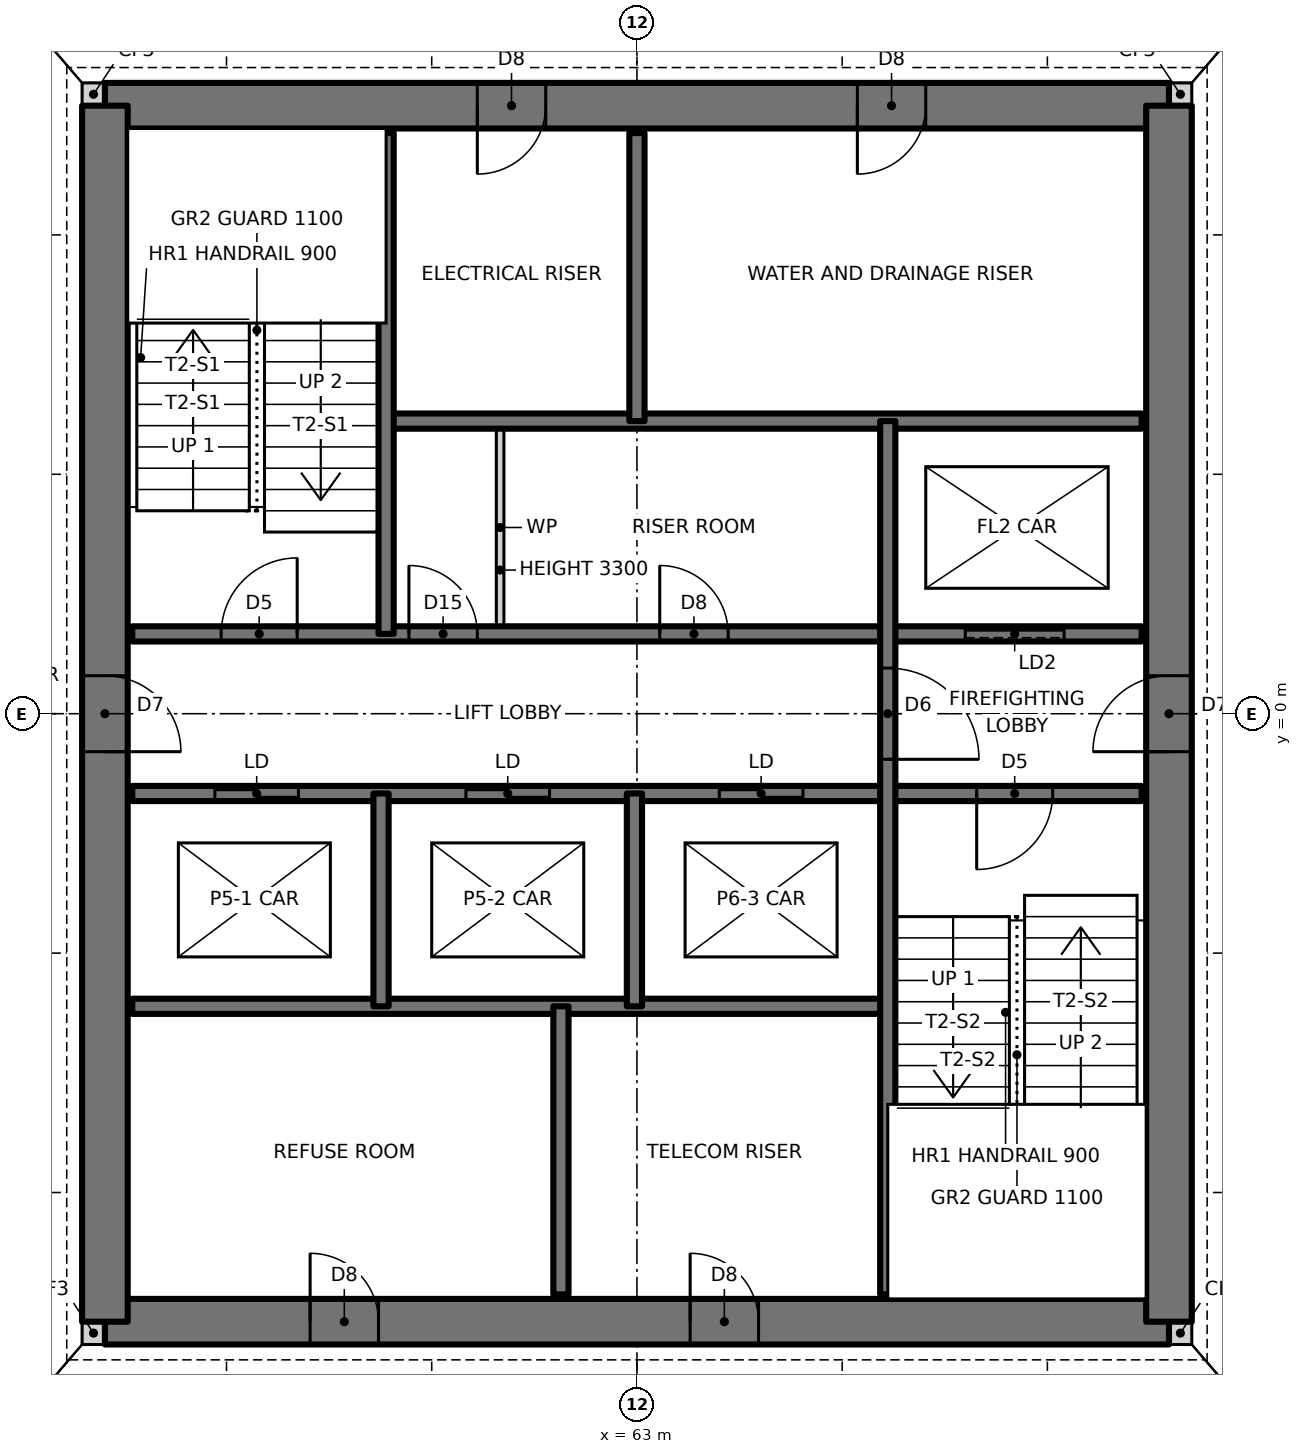
"""IFC4 building model, lengths in metres.
Left out: names, types, materials, properties, quantities, classifications, styles, units other than length and angle.
Written with IfcOpenShell. Run it as: python <this file> out.ifc"""

import sys

from ifc_helpers import new_model, si_unit, direction, frame, frame_2d, origin, place, context, subcontext, project, spatial, rectangle, extrude, element, fill, save


model = new_model("IFC4")
c1 = context("Model", 3, precision=1e-05, world=origin(), true_north=direction((0.0, 1.0)))
c2 = subcontext(c1, "Body", "Model", "MODEL_VIEW")
j1 = project(units=[si_unit("LENGTHUNIT", "METRE"), si_unit("PLANEANGLEUNIT", "RADIAN")], contexts=[c1])
p1 = place(None, origin())
s1 = spatial("IfcSite", under=j1, at=p1, CompositionType="ELEMENT")
p2 = place(p1, origin())
s2 = spatial("IfcBuilding", under=s1, at=p2, CompositionType="ELEMENT")
p3 = place(p2, frame((0.0, 0.0, 46.5)))
s3 = spatial("IfcBuildingStorey", under=s2, at=p3, CompositionType="ELEMENT", Elevation=46.5)
for number, where, z_axis, x_axis in (
    (1, (55.7, -8.15, 0.0), (0.0, 0.0, 1.0), (1.0, 0.0, 0.0)),
    (2, (70.0, -8.15, 0.0), (0.0, 0.0, 1.0), (1.0, 0.0, 0.0)),
    (3, (70.0, 8.15, 0.0), (0.0, 0.0, 1.0), (1.0, 0.0, 0.0)),
    (4, (55.7, 8.15, 0.0), (0.0, 0.0, 1.0), (1.0, 0.0, 0.0)),
):
    element("IfcWall", number, at=place(p3, frame(where, z_axis=z_axis, x_axis=x_axis)), inside=s3, PredefinedType="SOLIDWALL", context=c2, shape_type="SweptSolid", body=[
        extrude(rectangle(XDim=0.3, YDim=0.3, at=frame_2d((0.15, 0.0))), origin(), (0.0, 0.0, 1.0), 3.5),
    ])
p4 = place(p3, frame((56.0, -8.0, 0.0), z_axis=(0.0, 0.0, 1.0), x_axis=(1.0, 0.0, 0.0)))
e5 = element("IfcWall", 5, at=p4, inside=s3, PredefinedType="SHEAR", context=c2, shape_type="SweptSolid", body=[
    extrude(rectangle(XDim=14.0, YDim=0.6, at=frame_2d((7.0, 0.0))), origin(), (0.0, 0.0, 1.0), 3.5),
])
p5 = place(p4, frame((2.7, 0.0, 0.0)))
e6 = element("IfcOpeningElement", 6, at=p5, cuts=e5, PredefinedType="OPENING", context=c2, shape_type="SweptSolid", body=[
    extrude(rectangle(XDim=0.9, YDim=2.1, at=frame_2d((0.45, 1.05))), frame((0.0, 0.31, 0.0), z_axis=(0.0, -1.0, 0.0), x_axis=(1.0, 0.0, 0.0)), (0.0, 0.0, 1.0), 0.62),
])
p6 = place(p4, frame((7.7, 0.0, 0.0)))
e7 = element("IfcOpeningElement", 7, at=p6, cuts=e5, PredefinedType="OPENING", context=c2, shape_type="SweptSolid", body=[
    extrude(rectangle(XDim=0.9, YDim=2.1, at=frame_2d((0.45, 1.05))), frame((0.0, 0.31, 0.0), z_axis=(0.0, -1.0, 0.0), x_axis=(1.0, 0.0, 0.0)), (0.0, 0.0, 1.0), 0.62),
])
p7 = place(p3, frame((70.0, 8.0, 0.0), z_axis=(0.0, 0.0, 1.0), x_axis=(-1.0, 0.0, 0.0)))
e8 = element("IfcWall", 8, at=p7, inside=s3, PredefinedType="SHEAR", context=c2, shape_type="SweptSolid", body=[
    extrude(rectangle(XDim=14.0, YDim=0.6, at=frame_2d((7.0, 0.0))), origin(), (0.0, 0.0, 1.0), 3.5),
])
p8 = place(p7, frame((8.2, 0.0, 0.0)))
e9 = element("IfcOpeningElement", 9, at=p8, cuts=e8, PredefinedType="OPENING", context=c2, shape_type="SweptSolid", body=[
    extrude(rectangle(XDim=0.9, YDim=2.1, at=frame_2d((0.45, 1.05))), frame((0.0, 0.31, 0.0), z_axis=(0.0, -1.0, 0.0), x_axis=(1.0, 0.0, 0.0)), (0.0, 0.0, 1.0), 0.62),
])
p9 = place(p7, frame((3.2, 0.0, 0.0)))
e10 = element("IfcOpeningElement", 10, at=p9, cuts=e8, PredefinedType="OPENING", context=c2, shape_type="SweptSolid", body=[
    extrude(rectangle(XDim=0.9, YDim=2.1, at=frame_2d((0.45, 1.05))), frame((0.0, 0.31, 0.0), z_axis=(0.0, -1.0, 0.0), x_axis=(1.0, 0.0, 0.0)), (0.0, 0.0, 1.0), 0.62),
])
p10 = place(p3, frame((70.0, -8.0, 0.0), z_axis=(0.0, 0.0, 1.0), x_axis=(0.0, 1.0, 0.0)))
e11 = element("IfcWall", 11, at=p10, inside=s3, PredefinedType="SHEAR", context=c2, shape_type="SweptSolid", body=[
    extrude(rectangle(XDim=16.0, YDim=0.6, at=frame_2d((8.0, 0.0))), origin(), (0.0, 0.0, 1.0), 3.5),
])
p11 = place(p10, frame((7.5, 0.0, 0.0)))
e12 = element("IfcOpeningElement", 12, at=p11, cuts=e11, PredefinedType="OPENING", context=c2, shape_type="SweptSolid", body=[
    extrude(rectangle(XDim=1.0, YDim=2.1, at=frame_2d((0.5, 1.05))), frame((0.0, 0.31, 0.0), z_axis=(0.0, -1.0, 0.0), x_axis=(1.0, 0.0, 0.0)), (0.0, 0.0, 1.0), 0.62),
])
p12 = place(p3, frame((56.0, 8.0, 0.0), z_axis=(0.0, 0.0, 1.0), x_axis=(0.0, -1.0, 0.0)))
e13 = element("IfcWall", 13, at=p12, inside=s3, PredefinedType="SHEAR", context=c2, shape_type="SweptSolid", body=[
    extrude(rectangle(XDim=16.0, YDim=0.6, at=frame_2d((8.0, 0.0))), origin(), (0.0, 0.0, 1.0), 3.5),
])
p13 = place(p12, frame((7.5, 0.0, 0.0)))
e14 = element("IfcOpeningElement", 14, at=p13, cuts=e13, PredefinedType="OPENING", context=c2, shape_type="SweptSolid", body=[
    extrude(rectangle(XDim=1.0, YDim=2.1, at=frame_2d((0.5, 1.05))), frame((0.0, 0.31, 0.0), z_axis=(0.0, -1.0, 0.0), x_axis=(1.0, 0.0, 0.0)), (0.0, 0.0, 1.0), 0.62),
])
p14 = place(p3, frame((56.36, -3.85, 0.0), z_axis=(0.0, 0.0, 1.0), x_axis=(1.0, 0.0, 0.0)))
e15 = element("IfcWall", 15, at=p14, inside=s3, PredefinedType="SOLIDWALL", context=c2, shape_type="SweptSolid", body=[
    extrude(rectangle(XDim=9.94, YDim=0.2, at=frame_2d((4.97, 0.0))), origin(), (0.0, 0.0, 1.0), 3.5),
])
p15 = place(p3, frame((56.36, -1.05, 0.0), z_axis=(0.0, 0.0, 1.0), x_axis=(1.0, 0.0, 0.0)))
e16 = element("IfcWall", 16, at=p15, inside=s3, PredefinedType="SOLIDWALL", context=c2, shape_type="SweptSolid", body=[
    extrude(rectangle(XDim=13.28, YDim=0.2, at=frame_2d((6.64, 0.0))), origin(), (0.0, 0.0, 1.0), 3.5),
])
p16 = place(p15, frame((11.11, 0.0, 0.0)))
e17 = element("IfcOpeningElement", 17, at=p16, cuts=e16, PredefinedType="OPENING", context=c2, shape_type="SweptSolid", body=[
    extrude(rectangle(XDim=1.0, YDim=2.1, at=frame_2d((0.5, 1.05))), frame((0.0, 0.11, 0.0), z_axis=(0.0, -1.0, 0.0), x_axis=(1.0, 0.0, 0.0)), (0.0, 0.0, 1.0), 0.22),
])
p17 = place(p15, frame((1.087, 0.0, 0.0)))
e18 = element("IfcOpeningElement", 18, at=p17, cuts=e16, PredefinedType="OPENING", context=c2, shape_type="SweptSolid", body=[
    extrude(rectangle(XDim=1.1, YDim=2.1, at=frame_2d((0.55, 1.05))), frame((0.0, 0.11, 0.0), z_axis=(0.0, -1.0, 0.0), x_axis=(1.0, 0.0, 0.0)), (0.0, 0.0, 1.0), 0.22),
])
p18 = place(p15, frame((4.39, 0.0, 0.0)))
e19 = element("IfcOpeningElement", 19, at=p18, cuts=e16, PredefinedType="OPENING", context=c2, shape_type="SweptSolid", body=[
    extrude(rectangle(XDim=1.1, YDim=2.1, at=frame_2d((0.55, 1.05))), frame((0.0, 0.11, 0.0), z_axis=(0.0, -1.0, 0.0), x_axis=(1.0, 0.0, 0.0)), (0.0, 0.0, 1.0), 0.22),
])
p19 = place(p15, frame((7.724, 0.0, 0.0)))
e20 = element("IfcOpeningElement", 20, at=p19, cuts=e16, PredefinedType="OPENING", context=c2, shape_type="SweptSolid", body=[
    extrude(rectangle(XDim=1.1, YDim=2.1, at=frame_2d((0.55, 1.05))), frame((0.0, 0.11, 0.0), z_axis=(0.0, -1.0, 0.0), x_axis=(1.0, 0.0, 0.0)), (0.0, 0.0, 1.0), 0.22),
])
p20 = place(p3, frame((56.36, 1.05, 0.0), z_axis=(0.0, 0.0, 1.0), x_axis=(1.0, 0.0, 0.0)))
e21 = element("IfcWall", 21, at=p20, inside=s3, PredefinedType="SOLIDWALL", context=c2, shape_type="SweptSolid", body=[
    extrude(rectangle(XDim=13.28, YDim=0.2, at=frame_2d((6.64, 0.0))), origin(), (0.0, 0.0, 1.0), 3.5),
])
p21 = place(p20, frame((1.17, 0.0, 0.0)))
e22 = element("IfcOpeningElement", 22, at=p21, cuts=e21, PredefinedType="OPENING", context=c2, shape_type="SweptSolid", body=[
    extrude(rectangle(XDim=1.0, YDim=2.1, at=frame_2d((0.5, 1.05))), frame((0.0, 0.11, 0.0), z_axis=(0.0, -1.0, 0.0), x_axis=(1.0, 0.0, 0.0)), (0.0, 0.0, 1.0), 0.22),
])
p22 = place(p20, frame((6.94, 0.0, 0.0)))
e23 = element("IfcOpeningElement", 23, at=p22, cuts=e21, PredefinedType="OPENING", context=c2, shape_type="SweptSolid", body=[
    extrude(rectangle(XDim=0.9, YDim=2.1, at=frame_2d((0.45, 1.05))), frame((0.0, 0.11, 0.0), z_axis=(0.0, -1.0, 0.0), x_axis=(1.0, 0.0, 0.0)), (0.0, 0.0, 1.0), 0.22),
])
p23 = place(p20, frame((3.64, 0.0, 0.0)))
e24 = element("IfcOpeningElement", 24, at=p23, cuts=e21, PredefinedType="OPENING", context=c2, shape_type="SweptSolid", body=[
    extrude(rectangle(XDim=0.9, YDim=2.1, at=frame_2d((0.45, 1.05))), frame((0.0, 0.11, 0.0), z_axis=(0.0, -1.0, 0.0), x_axis=(1.0, 0.0, 0.0)), (0.0, 0.0, 1.0), 0.22),
])
p24 = place(p20, frame((10.96, 0.0, 0.0)))
e25 = element("IfcOpeningElement", 25, at=p24, cuts=e21, PredefinedType="OPENING", context=c2, shape_type="SweptSolid", body=[
    extrude(rectangle(XDim=1.3, YDim=2.1, at=frame_2d((0.65, 1.05))), frame((0.0, 0.11, 0.0), z_axis=(0.0, -1.0, 0.0), x_axis=(1.0, 0.0, 0.0)), (0.0, 0.0, 1.0), 0.22),
])
p25 = place(p3, frame((59.7, 3.85, 0.0), z_axis=(0.0, 0.0, 1.0), x_axis=(1.0, 0.0, 0.0)))
e26 = element("IfcWall", 26, at=p25, inside=s3, PredefinedType="SOLIDWALL", context=c2, shape_type="SweptSolid", body=[
    extrude(rectangle(XDim=9.94, YDim=0.2, at=frame_2d((4.97, 0.0))), origin(), (0.0, 0.0, 1.0), 3.5),
])
p26 = place(p3, frame((66.3, -7.64, 0.0), z_axis=(0.0, 0.0, 1.0), x_axis=(0.0, 1.0, 0.0)))
e27 = element("IfcWall", 27, at=p26, inside=s3, PredefinedType="SOLIDWALL", context=c2, shape_type="SweptSolid", body=[
    extrude(rectangle(XDim=11.49, YDim=0.2, at=frame_2d((5.745, 0.0))), origin(), (0.0, 0.0, 1.0), 3.5),
])
p27 = place(p26, frame((7.04, 0.0, 0.0)))
e28 = element("IfcOpeningElement", 28, at=p27, cuts=e27, PredefinedType="OPENING", context=c2, shape_type="SweptSolid", body=[
    extrude(rectangle(XDim=1.2, YDim=2.1, at=frame_2d((0.6, 1.05))), frame((0.0, 0.11, 0.0), z_axis=(0.0, -1.0, 0.0), x_axis=(1.0, 0.0, 0.0)), (0.0, 0.0, 1.0), 0.22),
])
p28 = place(p3, frame((63.0, 3.85, 0.0), z_axis=(0.0, 0.0, 1.0), x_axis=(0.0, 1.0, 0.0)))
e29 = element("IfcWall", 29, at=p28, inside=s3, PredefinedType="SOLIDWALL", context=c2, shape_type="SweptSolid", body=[
    extrude(rectangle(XDim=3.79, YDim=0.2, at=frame_2d((1.895, 0.0))), origin(), (0.0, 0.0, 1.0), 3.5),
])
p29 = place(p3, frame((62.967, -3.85, 0.0), z_axis=(0.0, 0.0, 1.0), x_axis=(0.0, 1.0, 0.0)))
e30 = element("IfcWall", 30, at=p29, inside=s3, PredefinedType="SOLIDWALL", context=c2, shape_type="SweptSolid", body=[
    extrude(rectangle(XDim=2.8, YDim=0.2, at=frame_2d((1.4, 0.0))), origin(), (0.0, 0.0, 1.0), 3.5),
])
p30 = place(p3, frame((62.0, -7.64, 0.0), z_axis=(0.0, 0.0, 1.0), x_axis=(0.0, 1.0, 0.0)))
e31 = element("IfcWall", 31, at=p30, inside=s3, PredefinedType="SOLIDWALL", context=c2, shape_type="SweptSolid", body=[
    extrude(rectangle(XDim=3.79, YDim=0.2, at=frame_2d((1.895, 0.0))), origin(), (0.0, 0.0, 1.0), 3.5),
])
p31 = place(p3, frame((61.2, 1.05, 0.0), z_axis=(0.0, 0.0, 1.0), x_axis=(0.0, 1.0, 0.0)))
e32 = element("IfcWall", 32, at=p31, inside=s3, PredefinedType="PARTITIONING", context=c2, shape_type="SweptSolid", body=[
    extrude(rectangle(XDim=2.8, YDim=0.1, at=frame_2d((1.4, 0.0))), origin(), (0.0, 0.0, 1.0), 3.3),
])
p32 = place(p3, frame((59.7, 1.05, 0.0), z_axis=(0.0, 0.0, 1.0), x_axis=(0.0, 1.0, 0.0)))
e33 = element("IfcWall", 33, at=p32, inside=s3, PredefinedType="SOLIDWALL", context=c2, shape_type="SweptSolid", body=[
    extrude(rectangle(XDim=6.59, YDim=0.2, at=frame_2d((3.295, 0.0))), origin(), (0.0, 0.0, 1.0), 3.5),
])
p33 = place(p3, frame((59.633, -3.85, 0.0), z_axis=(0.0, 0.0, 1.0), x_axis=(0.0, 1.0, 0.0)))
e34 = element("IfcWall", 34, at=p33, inside=s3, PredefinedType="SOLIDWALL", context=c2, shape_type="SweptSolid", body=[
    extrude(rectangle(XDim=2.8, YDim=0.2, at=frame_2d((1.4, 0.0))), origin(), (0.0, 0.0, 1.0), 3.5),
])
p34 = place(p21, origin())
e35 = element("IfcDoor", 35, at=p34, inside=s3, OperationType="SINGLE_SWING_RIGHT", PredefinedType="DOOR", context=c2, shape_type="SweptSolid", body=[
    extrude(rectangle(XDim=1.0, YDim=2.1, at=frame_2d((0.5, 1.05))), frame((0.0, 0.025, 0.0), z_axis=(0.0, -1.0, 0.0), x_axis=(1.0, 0.0, 0.0)), (0.0, 0.0, 1.0), 0.05),
])
fill(e22, e35)
p35 = place(p16, frame((1.0, 0.0, 0.0), z_axis=(0.0, 0.0, 1.0), x_axis=(-1.0, 0.0, 0.0)))
e36 = element("IfcDoor", 36, at=p35, inside=s3, OperationType="SINGLE_SWING_RIGHT", PredefinedType="DOOR", context=c2, shape_type="SweptSolid", body=[
    extrude(rectangle(XDim=1.0, YDim=2.1, at=frame_2d((0.5, 1.05))), frame((0.0, 0.025, 0.0), z_axis=(0.0, -1.0, 0.0), x_axis=(1.0, 0.0, 0.0)), (0.0, 0.0, 1.0), 0.05),
])
fill(e17, e36)
p36 = place(p27, frame((1.2, 0.0, 0.0), z_axis=(0.0, 0.0, 1.0), x_axis=(-1.0, 0.0, 0.0)))
e37 = element("IfcDoor", 37, at=p36, inside=s3, OperationType="SINGLE_SWING_RIGHT", PredefinedType="DOOR", context=c2, shape_type="SweptSolid", body=[
    extrude(rectangle(XDim=1.2, YDim=2.1, at=frame_2d((0.6, 1.05))), frame((0.0, 0.025, 0.0), z_axis=(0.0, -1.0, 0.0), x_axis=(1.0, 0.0, 0.0)), (0.0, 0.0, 1.0), 0.05),
])
fill(e28, e37)
p37 = place(p22, origin())
e38 = element("IfcDoor", 38, at=p37, inside=s3, OperationType="SINGLE_SWING_LEFT", PredefinedType="DOOR", context=c2, shape_type="SweptSolid", body=[
    extrude(rectangle(XDim=0.9, YDim=2.1, at=frame_2d((0.45, 1.05))), frame((0.0, 0.025, 0.0), z_axis=(0.0, -1.0, 0.0), x_axis=(1.0, 0.0, 0.0)), (0.0, 0.0, 1.0), 0.05),
])
fill(e23, e38)
p38 = place(p23, origin())
e39 = element("IfcDoor", 39, at=p38, inside=s3, OperationType="SINGLE_SWING_LEFT", PredefinedType="DOOR", context=c2, shape_type="SweptSolid", body=[
    extrude(rectangle(XDim=0.9, YDim=2.1, at=frame_2d((0.45, 1.05))), frame((0.0, 0.025, 0.0), z_axis=(0.0, -1.0, 0.0), x_axis=(1.0, 0.0, 0.0)), (0.0, 0.0, 1.0), 0.05),
])
fill(e24, e39)
p39 = place(p13, origin())
e40 = element("IfcDoor", 40, at=p39, inside=s3, OperationType="SINGLE_SWING_RIGHT", PredefinedType="DOOR", context=c2, shape_type="SweptSolid", body=[
    extrude(rectangle(XDim=1.0, YDim=2.1, at=frame_2d((0.5, 1.05))), frame((0.0, 0.025, 0.0), z_axis=(0.0, -1.0, 0.0), x_axis=(1.0, 0.0, 0.0)), (0.0, 0.0, 1.0), 0.05),
])
fill(e14, e40)
p40 = place(p11, origin())
e41 = element("IfcDoor", 41, at=p40, inside=s3, OperationType="SINGLE_SWING_LEFT", PredefinedType="DOOR", context=c2, shape_type="SweptSolid", body=[
    extrude(rectangle(XDim=1.0, YDim=2.1, at=frame_2d((0.5, 1.05))), frame((0.0, 0.025, 0.0), z_axis=(0.0, -1.0, 0.0), x_axis=(1.0, 0.0, 0.0)), (0.0, 0.0, 1.0), 0.05),
])
fill(e12, e41)
p41 = place(p8, origin())
e42 = element("IfcDoor", 42, at=p41, inside=s3, OperationType="SINGLE_SWING_RIGHT", PredefinedType="DOOR", context=c2, shape_type="SweptSolid", body=[
    extrude(rectangle(XDim=0.9, YDim=2.1, at=frame_2d((0.45, 1.05))), frame((0.0, 0.025, 0.0), z_axis=(0.0, -1.0, 0.0), x_axis=(1.0, 0.0, 0.0)), (0.0, 0.0, 1.0), 0.05),
])
fill(e9, e42)
p42 = place(p9, origin())
e43 = element("IfcDoor", 43, at=p42, inside=s3, OperationType="SINGLE_SWING_RIGHT", PredefinedType="DOOR", context=c2, shape_type="SweptSolid", body=[
    extrude(rectangle(XDim=0.9, YDim=2.1, at=frame_2d((0.45, 1.05))), frame((0.0, 0.025, 0.0), z_axis=(0.0, -1.0, 0.0), x_axis=(1.0, 0.0, 0.0)), (0.0, 0.0, 1.0), 0.05),
])
fill(e10, e43)
p43 = place(p5, origin())
e44 = element("IfcDoor", 44, at=p43, inside=s3, OperationType="SINGLE_SWING_LEFT", PredefinedType="DOOR", context=c2, shape_type="SweptSolid", body=[
    extrude(rectangle(XDim=0.9, YDim=2.1, at=frame_2d((0.45, 1.05))), frame((0.0, 0.025, 0.0), z_axis=(0.0, -1.0, 0.0), x_axis=(1.0, 0.0, 0.0)), (0.0, 0.0, 1.0), 0.05),
])
fill(e6, e44)
p44 = place(p6, origin())
e45 = element("IfcDoor", 45, at=p44, inside=s3, OperationType="SINGLE_SWING_LEFT", PredefinedType="DOOR", context=c2, shape_type="SweptSolid", body=[
    extrude(rectangle(XDim=0.9, YDim=2.1, at=frame_2d((0.45, 1.05))), frame((0.0, 0.025, 0.0), z_axis=(0.0, -1.0, 0.0), x_axis=(1.0, 0.0, 0.0)), (0.0, 0.0, 1.0), 0.05),
])
fill(e7, e45)
p45 = place(p17, origin())
e46 = element("IfcDoor", 46, at=p45, inside=s3, OperationType="DOUBLE_DOOR_SLIDING", PredefinedType="DOOR", context=c2, shape_type="SweptSolid", body=[
    extrude(rectangle(XDim=1.1, YDim=2.1, at=frame_2d((0.55, 1.05))), frame((0.0, 0.025, 0.0), z_axis=(0.0, -1.0, 0.0), x_axis=(1.0, 0.0, 0.0)), (0.0, 0.0, 1.0), 0.05),
])
fill(e18, e46)
p46 = place(p18, origin())
e47 = element("IfcDoor", 47, at=p46, inside=s3, OperationType="DOUBLE_DOOR_SLIDING", PredefinedType="DOOR", context=c2, shape_type="SweptSolid", body=[
    extrude(rectangle(XDim=1.1, YDim=2.1, at=frame_2d((0.55, 1.05))), frame((0.0, 0.025, 0.0), z_axis=(0.0, -1.0, 0.0), x_axis=(1.0, 0.0, 0.0)), (0.0, 0.0, 1.0), 0.05),
])
fill(e19, e47)
p47 = place(p19, origin())
e48 = element("IfcDoor", 48, at=p47, inside=s3, OperationType="DOUBLE_DOOR_SLIDING", PredefinedType="DOOR", context=c2, shape_type="SweptSolid", body=[
    extrude(rectangle(XDim=1.1, YDim=2.1, at=frame_2d((0.55, 1.05))), frame((0.0, 0.025, 0.0), z_axis=(0.0, -1.0, 0.0), x_axis=(1.0, 0.0, 0.0)), (0.0, 0.0, 1.0), 0.05),
])
fill(e20, e48)
p48 = place(p24, origin())
e49 = element("IfcDoor", 49, at=p48, inside=s3, OperationType="SLIDING_TO_LEFT", PredefinedType="DOOR", context=c2, shape_type="SweptSolid", body=[
    extrude(rectangle(XDim=1.3, YDim=2.1, at=frame_2d((0.65, 1.05))), frame((0.0, 0.025, 0.0), z_axis=(0.0, -1.0, 0.0), x_axis=(1.0, 0.0, 0.0)), (0.0, 0.0, 1.0), 0.05),
])
fill(e25, e49)
save(model, sys.argv[1])
